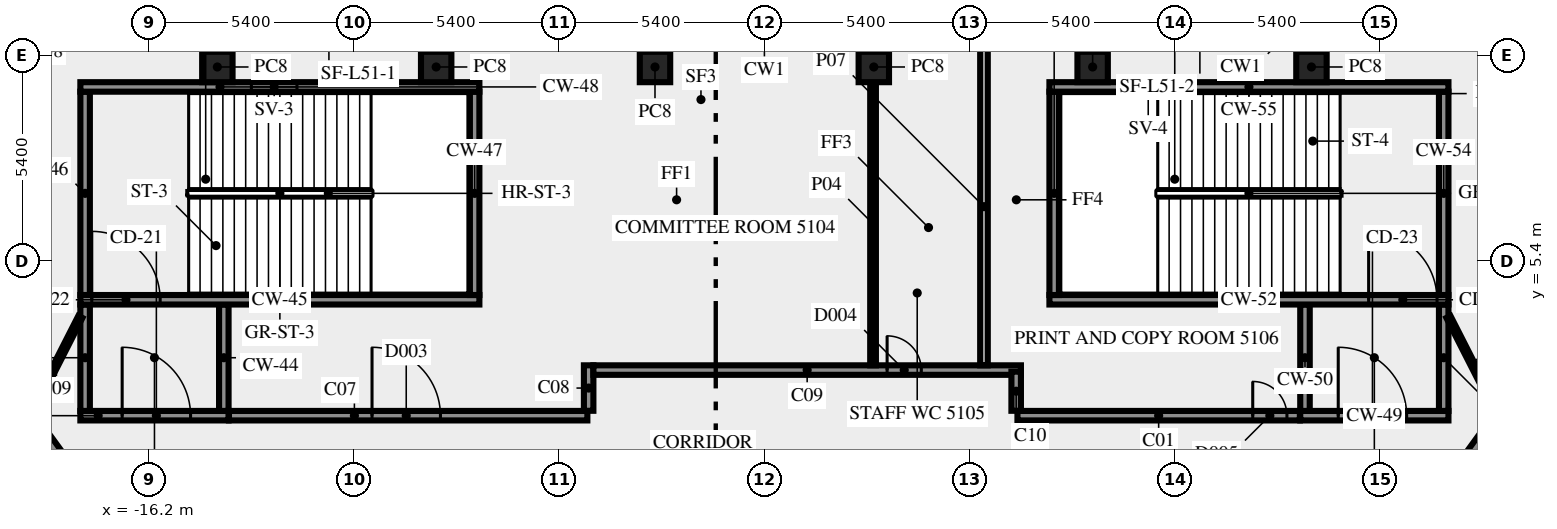
"""IFC4 building model, lengths in metres.
Left out: names, types, materials, properties, quantities, classifications, styles, units other than length and angle.
Written with IfcOpenShell. Run it as: python <this file> out.ifc"""

import sys

from ifc_helpers import new_model, si_unit, direction, frame, frame_2d, origin, origin_2d, place, context, subcontext, project, spatial, rectangle, extrude, element, fill, save


model = new_model("IFC4")
c1 = context("Model", 3, precision=1e-05, world=origin(), true_north=direction((0.0, 1.0)))
c2 = subcontext(c1, "Body", "Model", "MODEL_VIEW")
j1 = project(units=[si_unit("LENGTHUNIT", "METRE"), si_unit("PLANEANGLEUNIT", "RADIAN")], contexts=[c1])
p1 = place(None, origin())
s1 = spatial("IfcSite", under=j1, at=p1, CompositionType="ELEMENT")
p2 = place(p1, origin())
s2 = spatial("IfcBuilding", under=s1, at=p2, CompositionType="ELEMENT")
p3 = place(p2, frame((0.0, 0.0, 218.0)))
s3 = spatial("IfcBuildingStorey", under=s2, at=p3, CompositionType="ELEMENT", Elevation=218.0)
for number, where, z_axis, x_axis in (
    (1, (14.395, 10.5, 0.0), (0.0, 0.0, 1.0), (-1.0, 0.0, 0.0)),
    (2, (8.637, 10.5, 0.0), (0.0, 0.0, 1.0), (-1.0, 0.0, 0.0)),
    (3, (2.879, 10.5, 0.0), (0.0, 0.0, 1.0), (-1.0, 0.0, 0.0)),
    (4, (-2.879, 10.5, 0.0), (0.0, 0.0, 1.0), (-1.0, 0.0, 0.0)),
    (5, (-8.637, 10.5, 0.0), (0.0, 0.0, 1.0), (-1.0, 0.0, 0.0)),
    (6, (-14.395, 10.5, 0.0), (0.0, 0.0, 1.0), (-1.0, 0.0, 0.0)),
):
    element("IfcColumn", number, at=place(p3, frame(where, z_axis=z_axis, x_axis=x_axis)), inside=s3, PredefinedType="COLUMN", context=c2, shape_type="SweptSolid", body=[
        extrude(rectangle(XDim=0.8, YDim=0.8, at=origin_2d()), origin(), (0.0, 0.0, 1.0), 3.65),
    ])
p4 = place(p3, frame((-18.0, 1.325, 0.0), z_axis=(0.0, 0.0, 1.0), x_axis=(1.0, 0.0, 0.0)))
e7 = element("IfcWall", 7, at=p4, inside=s3, PredefinedType="SHEAR", context=c2, shape_type="SweptSolid", body=[
    extrude(rectangle(XDim=3.9, YDim=0.25, at=frame_2d((1.95, 0.0))), origin(), (0.0, 0.0, 1.0), 3.65),
])
p5 = place(p4, frame((1.1, 0.0, 0.0)))
e8 = element("IfcOpeningElement", 8, at=p5, cuts=e7, PredefinedType="OPENING", context=c2, shape_type="SweptSolid", body=[
    extrude(rectangle(XDim=1.8, YDim=2.1, at=frame_2d((0.9, 1.05))), frame((0.0, 0.135, 0.0), z_axis=(0.0, -1.0, 0.0), x_axis=(1.0, 0.0, 0.0)), (0.0, 0.0, 1.0), 0.27),
])
for number, where, z_axis, x_axis in (
    (9, (-17.875, 1.45, 0.0), (0.0, 0.0, 1.0), (0.0, 1.0, 0.0)),
    (10, (-14.225, 1.45, 0.0), (0.0, 0.0, 1.0), (0.0, 1.0, 0.0)),
):
    element("IfcWall", number, at=place(p3, frame(where, z_axis=z_axis, x_axis=x_axis)), inside=s3, PredefinedType="SHEAR", context=c2, shape_type="SweptSolid", body=[
        extrude(rectangle(XDim=2.8, YDim=0.25, at=frame_2d((1.4, 0.0))), origin(), (0.0, 0.0, 1.0), 3.65),
    ])
p6 = place(p3, frame((-18.0, 4.375, 0.0), z_axis=(0.0, 0.0, 1.0), x_axis=(1.0, 0.0, 0.0)))
e11 = element("IfcWall", 11, at=p6, inside=s3, PredefinedType="SHEAR", context=c2, shape_type="SweptSolid", body=[
    extrude(rectangle(XDim=10.5, YDim=0.25, at=frame_2d((5.25, 0.0))), origin(), (0.0, 0.0, 1.0), 3.65),
])
p7 = place(p6, frame((0.3, 0.0, 0.0)))
e12 = element("IfcOpeningElement", 12, at=p7, cuts=e11, PredefinedType="OPENING", context=c2, shape_type="SweptSolid", body=[
    extrude(rectangle(XDim=1.8, YDim=2.1, at=frame_2d((0.9, 1.05))), frame((0.0, 0.135, 0.0), z_axis=(0.0, -1.0, 0.0), x_axis=(1.0, 0.0, 0.0)), (0.0, 0.0, 1.0), 0.27),
])
for number, where, z_axis, x_axis in (
    (13, (-17.875, 4.5, 0.0), (0.0, 0.0, 1.0), (0.0, 1.0, 0.0)),
    (14, (-7.625, 4.5, 0.0), (0.0, 0.0, 1.0), (0.0, 1.0, 0.0)),
):
    element("IfcWall", number, at=place(p3, frame(where, z_axis=z_axis, x_axis=x_axis)), inside=s3, PredefinedType="SHEAR", context=c2, shape_type="SweptSolid", body=[
        extrude(rectangle(XDim=5.35, YDim=0.25, at=frame_2d((2.675, 0.0))), origin(), (0.0, 0.0, 1.0), 3.65),
    ])
p8 = place(p3, frame((-18.0, 9.975, 0.0), z_axis=(0.0, 0.0, 1.0), x_axis=(1.0, 0.0, 0.0)))
e15 = element("IfcWall", 15, at=p8, inside=s3, PredefinedType="SHEAR", context=c2, shape_type="SweptSolid", body=[
    extrude(rectangle(XDim=10.5, YDim=0.25, at=frame_2d((5.25, 0.0))), origin(), (0.0, 0.0, 1.0), 3.65),
])
p9 = place(p8, frame((4.5, 0.0, 1.0)))
e16 = element("IfcOpeningElement", 16, at=p9, cuts=e15, PredefinedType="OPENING", context=c2, shape_type="SweptSolid", body=[
    extrude(rectangle(XDim=1.2, YDim=1.2, at=frame_2d((0.6, 0.6))), frame((0.0, 0.135, 0.0), z_axis=(0.0, -1.0, 0.0), x_axis=(1.0, 0.0, 0.0)), (0.0, 0.0, 1.0), 0.27),
])
p10 = place(p3, frame((14.1, 1.325, 0.0), z_axis=(0.0, 0.0, 1.0), x_axis=(1.0, 0.0, 0.0)))
e17 = element("IfcWall", 17, at=p10, inside=s3, PredefinedType="SHEAR", context=c2, shape_type="SweptSolid", body=[
    extrude(rectangle(XDim=3.9, YDim=0.25, at=frame_2d((1.95, 0.0))), origin(), (0.0, 0.0, 1.0), 3.65),
])
p11 = place(p10, frame((1.0, 0.0, 0.0)))
e18 = element("IfcOpeningElement", 18, at=p11, cuts=e17, PredefinedType="OPENING", context=c2, shape_type="SweptSolid", body=[
    extrude(rectangle(XDim=1.8, YDim=2.1, at=frame_2d((0.9, 1.05))), frame((0.0, 0.135, 0.0), z_axis=(0.0, -1.0, 0.0), x_axis=(1.0, 0.0, 0.0)), (0.0, 0.0, 1.0), 0.27),
])
for number, where, z_axis, x_axis in (
    (19, (14.225, 1.45, 0.0), (0.0, 0.0, 1.0), (0.0, 1.0, 0.0)),
    (20, (17.875, 1.45, 0.0), (0.0, 0.0, 1.0), (0.0, 1.0, 0.0)),
):
    element("IfcWall", number, at=place(p3, frame(where, z_axis=z_axis, x_axis=x_axis)), inside=s3, PredefinedType="SHEAR", context=c2, shape_type="SweptSolid", body=[
        extrude(rectangle(XDim=2.8, YDim=0.25, at=frame_2d((1.4, 0.0))), origin(), (0.0, 0.0, 1.0), 3.65),
    ])
p12 = place(p3, frame((7.5, 4.375, 0.0), z_axis=(0.0, 0.0, 1.0), x_axis=(1.0, 0.0, 0.0)))
e21 = element("IfcWall", 21, at=p12, inside=s3, PredefinedType="SHEAR", context=c2, shape_type="SweptSolid", body=[
    extrude(rectangle(XDim=10.5, YDim=0.25, at=frame_2d((5.25, 0.0))), origin(), (0.0, 0.0, 1.0), 3.65),
])
p13 = place(p12, frame((8.4, 0.0, 0.0)))
e22 = element("IfcOpeningElement", 22, at=p13, cuts=e21, PredefinedType="OPENING", context=c2, shape_type="SweptSolid", body=[
    extrude(rectangle(XDim=1.8, YDim=2.1, at=frame_2d((0.9, 1.05))), frame((0.0, 0.135, 0.0), z_axis=(0.0, -1.0, 0.0), x_axis=(1.0, 0.0, 0.0)), (0.0, 0.0, 1.0), 0.27),
])
for number, where, z_axis, x_axis in (
    (23, (7.625, 4.5, 0.0), (0.0, 0.0, 1.0), (0.0, 1.0, 0.0)),
    (24, (17.875, 4.5, 0.0), (0.0, 0.0, 1.0), (0.0, 1.0, 0.0)),
):
    element("IfcWall", number, at=place(p3, frame(where, z_axis=z_axis, x_axis=x_axis)), inside=s3, PredefinedType="SHEAR", context=c2, shape_type="SweptSolid", body=[
        extrude(rectangle(XDim=5.35, YDim=0.25, at=frame_2d((2.675, 0.0))), origin(), (0.0, 0.0, 1.0), 3.65),
    ])
p14 = place(p3, frame((7.5, 9.975, 0.0), z_axis=(0.0, 0.0, 1.0), x_axis=(1.0, 0.0, 0.0)))
e25 = element("IfcWall", 25, at=p14, inside=s3, PredefinedType="SHEAR", context=c2, shape_type="SweptSolid", body=[
    extrude(rectangle(XDim=10.5, YDim=0.25, at=frame_2d((5.25, 0.0))), origin(), (0.0, 0.0, 1.0), 3.65),
])
p15 = place(p14, frame((2.0, 0.0, 1.0)))
e26 = element("IfcOpeningElement", 26, at=p15, cuts=e25, PredefinedType="OPENING", context=c2, shape_type="SweptSolid", body=[
    extrude(rectangle(XDim=1.2, YDim=1.2, at=frame_2d((0.6, 0.6))), frame((0.0, 0.135, 0.0), z_axis=(0.0, -1.0, 0.0), x_axis=(1.0, 0.0, 0.0)), (0.0, 0.0, 1.0), 0.27),
])
p16 = place(p3, frame((6.659, 1.325, 0.0), z_axis=(0.0, 0.0, 1.0), x_axis=(1.0, 0.0, 0.0)))
e27 = element("IfcWall", 27, at=p16, inside=s3, PredefinedType="SOLIDWALL", context=c2, shape_type="SweptSolid", body=[
    extrude(rectangle(XDim=7.431, YDim=0.25, at=frame_2d((3.716, 0.0))), origin(), (0.0, 0.0, 1.0), 3.65),
])
p17 = place(p16, frame((6.191, 0.0, 0.0)))
e28 = element("IfcOpeningElement", 28, at=p17, cuts=e27, PredefinedType="OPENING", context=c2, shape_type="SweptSolid", body=[
    extrude(rectangle(XDim=0.9, YDim=2.1, at=frame_2d((0.45, 1.05))), frame((0.0, 0.135, 0.0), z_axis=(0.0, -1.0, 0.0), x_axis=(1.0, 0.0, 0.0)), (0.0, 0.0, 1.0), 0.27),
])
p18 = place(p3, frame((17.545, -1.125, 0.0), z_axis=(0.0, 0.0, 1.0), x_axis=(0.587787966774, 0.809015022181, 0.0)))
e29 = element("IfcWall", 29, at=p18, inside=s3, PredefinedType="SOLIDWALL", context=c2, shape_type="SweptSolid", body=[
    extrude(rectangle(XDim=23.345, YDim=0.25, at=frame_2d((11.672, 0.0))), origin(), (0.0, 0.0, 1.0), 3.65),
])
p19 = place(p18, frame((3.441, 0.0, 0.0)))
e30 = element("IfcOpeningElement", 30, at=p19, cuts=e29, PredefinedType="OPENING", context=c2, shape_type="SweptSolid", body=[
    extrude(rectangle(XDim=0.9, YDim=2.1, at=frame_2d((0.45, 1.05))), frame((0.0, 0.135, 0.0), z_axis=(0.0, -1.0, 0.0), x_axis=(1.0, 0.0, 0.0)), (0.0, 0.0, 1.0), 0.27),
])
p20 = place(p3, frame((-31.918, 18.658, 0.0), z_axis=(0.0, 0.0, 1.0), x_axis=(0.587788731405, -0.80901446664, 0.0)))
e31 = element("IfcWall", 31, at=p20, inside=s3, PredefinedType="SOLIDWALL", context=c2, shape_type="SweptSolid", body=[
    extrude(rectangle(XDim=24.453, YDim=0.25, at=frame_2d((12.227, 0.0))), origin(), (0.0, 0.0, 1.0), 3.65),
])
p21 = place(p20, frame((8.395, 0.0, 0.0)))
e32 = element("IfcOpeningElement", 32, at=p21, cuts=e31, PredefinedType="OPENING", context=c2, shape_type="SweptSolid", body=[
    extrude(rectangle(XDim=1.0, YDim=2.1, at=frame_2d((0.5, 1.05))), frame((0.0, 0.135, 0.0), z_axis=(0.0, -1.0, 0.0), x_axis=(1.0, 0.0, 0.0)), (0.0, 0.0, 1.0), 0.27),
])
p22 = place(p20, frame((10.095, 0.0, 0.0)))
e33 = element("IfcOpeningElement", 33, at=p22, cuts=e31, PredefinedType="OPENING", context=c2, shape_type="SweptSolid", body=[
    extrude(rectangle(XDim=0.9, YDim=2.1, at=frame_2d((0.45, 1.05))), frame((0.0, 0.135, 0.0), z_axis=(0.0, -1.0, 0.0), x_axis=(1.0, 0.0, 0.0)), (0.0, 0.0, 1.0), 0.27),
])
p23 = place(p3, frame((-14.09, 1.325, 0.0), z_axis=(0.0, 0.0, 1.0), x_axis=(1.0, 0.0, 0.0)))
e34 = element("IfcWall", 34, at=p23, inside=s3, PredefinedType="SOLIDWALL", context=c2, shape_type="SweptSolid", body=[
    extrude(rectangle(XDim=9.431, YDim=0.25, at=frame_2d((4.716, 0.0))), origin(), (0.0, 0.0, 1.0), 3.65),
])
p24 = place(p23, frame((3.765, 0.0, 0.0)))
e35 = element("IfcOpeningElement", 35, at=p24, cuts=e34, PredefinedType="OPENING", context=c2, shape_type="SweptSolid", body=[
    extrude(rectangle(XDim=1.8, YDim=2.1, at=frame_2d((0.9, 1.05))), frame((0.0, 0.135, 0.0), z_axis=(0.0, -1.0, 0.0), x_axis=(1.0, 0.0, 0.0)), (0.0, 0.0, 1.0), 0.27),
])
p25 = place(p3, frame((-4.625, 1.454, 0.0), z_axis=(0.0, 0.0, 1.0), x_axis=(0.0, 1.0, 0.0)))
e36 = element("IfcWall", 36, at=p25, inside=s3, PredefinedType="SOLIDWALL", context=c2, shape_type="SweptSolid", body=[
    extrude(rectangle(XDim=1.196, YDim=0.25, at=frame_2d((0.598, 0.0))), origin(), (0.0, 0.0, 1.0), 3.65),
])
p26 = place(p3, frame((-4.5, 2.525, 0.0), z_axis=(0.0, 0.0, 1.0), x_axis=(1.0, 0.0, 0.0)))
e37 = element("IfcWall", 37, at=p26, inside=s3, PredefinedType="SOLIDWALL", context=c2, shape_type="SweptSolid", body=[
    extrude(rectangle(XDim=11.25, YDim=0.25, at=frame_2d((5.625, 0.0))), origin(), (0.0, 0.0, 1.0), 3.65),
])
p27 = place(p26, frame((7.729, 0.0, 0.0)))
e38 = element("IfcOpeningElement", 38, at=p27, cuts=e37, PredefinedType="OPENING", context=c2, shape_type="SweptSolid", body=[
    extrude(rectangle(XDim=0.9, YDim=2.1, at=frame_2d((0.45, 1.05))), frame((0.0, 0.135, 0.0), z_axis=(0.0, -1.0, 0.0), x_axis=(1.0, 0.0, 0.0)), (0.0, 0.0, 1.0), 0.27),
])
p28 = place(p3, frame((6.625, 2.484, 0.0), z_axis=(0.0, 0.0, 1.0), x_axis=(0.0, -1.0, 0.0)))
e39 = element("IfcWall", 39, at=p28, inside=s3, PredefinedType="SOLIDWALL", context=c2, shape_type="SweptSolid", body=[
    extrude(rectangle(XDim=1.03, YDim=0.25, at=frame_2d((0.515, 0.0))), origin(), (0.0, 0.0, 1.0), 3.65),
])
p29 = place(p3, frame((2.859, 2.65, 0.0), z_axis=(0.0, 0.0, 1.0), x_axis=(0.0, 1.0, 0.0)))
e40 = element("IfcWall", 40, at=p29, inside=s3, PredefinedType="PARTITIONING", context=c2, shape_type="SweptSolid", body=[
    extrude(rectangle(XDim=7.445, YDim=0.15, at=frame_2d((3.723, 0.0))), origin(), (0.0, 0.0, 1.0), 3.65),
])
p30 = place(p3, frame((-26.089, 10.848, 0.0), z_axis=(0.0, 0.0, 1.0), x_axis=(0.807661302092, 0.589646691759, 0.0)))
e41 = element("IfcWall", 41, at=p30, inside=s3, PredefinedType="PARTITIONING", context=c2, shape_type="SweptSolid", body=[
    extrude(rectangle(XDim=9.55, YDim=0.12, at=frame_2d((4.775, 0.0))), origin(), (0.0, 0.0, 1.0), 2.85),
])
p31 = place(p3, frame((5.778, 11.0, 0.0), z_axis=(0.0, 0.0, 1.0), x_axis=(0.0, -1.0, 0.0)))
e42 = element("IfcWall", 42, at=p31, inside=s3, PredefinedType="SOLIDWALL", context=c2, shape_type="SweptSolid", body=[
    extrude(rectangle(XDim=8.35, YDim=0.2, at=frame_2d((4.175, 0.0))), origin(), (0.0, 0.0, 1.0), 2.85),
])
for number, where, z_axis, x_axis in (
    (43, (18.0, 3.925, 0.0), (0.0, 0.0, 1.0), (0.454, -0.891, 0.0)),
    (44, (-19.261, 1.45, 0.0), (0.0, 0.0, 1.0), (0.454, 0.891, 0.0)),
):
    element("IfcWall", number, at=place(p3, frame(where, z_axis=z_axis, x_axis=x_axis)), inside=s3, PredefinedType="PARTITIONING", context=c2, shape_type="SweptSolid", body=[
        extrude(rectangle(XDim=2.778, YDim=0.12, at=frame_2d((1.389, 0.0))), origin(), (0.0, 0.0, 1.0), 3.65),
    ])
p32 = place(p5, origin())
e45 = element("IfcDoor", 45, at=p32, inside=s3, OperationType="DOUBLE_DOOR_SINGLE_SWING", PredefinedType="DOOR", context=c2, shape_type="SweptSolid", body=[
    extrude(rectangle(XDim=1.8, YDim=2.1, at=frame_2d((0.9, 1.05))), frame((0.0, 0.025, 0.0), z_axis=(0.0, -1.0, 0.0), x_axis=(1.0, 0.0, 0.0)), (0.0, 0.0, 1.0), 0.05),
])
fill(e8, e45)
p33 = place(p7, origin())
e46 = element("IfcDoor", 46, at=p33, inside=s3, OperationType="DOUBLE_DOOR_SINGLE_SWING", PredefinedType="DOOR", context=c2, shape_type="SweptSolid", body=[
    extrude(rectangle(XDim=1.8, YDim=2.1, at=frame_2d((0.9, 1.05))), frame((0.0, 0.025, 0.0), z_axis=(0.0, -1.0, 0.0), x_axis=(1.0, 0.0, 0.0)), (0.0, 0.0, 1.0), 0.05),
])
fill(e12, e46)
p34 = place(p9, origin())
e47 = element("IfcWindow", 47, at=p34, inside=s3, PartitioningType="SINGLE_PANEL", PredefinedType="WINDOW", context=c2, shape_type="SweptSolid", body=[
    extrude(rectangle(XDim=1.2, YDim=1.2, at=frame_2d((0.6, 0.6))), frame((0.0, 0.03, 0.0), z_axis=(0.0, -1.0, 0.0), x_axis=(1.0, 0.0, 0.0)), (0.0, 0.0, 1.0), 0.06),
])
fill(e16, e47)
p35 = place(p11, origin())
e48 = element("IfcDoor", 48, at=p35, inside=s3, OperationType="DOUBLE_DOOR_SINGLE_SWING", PredefinedType="DOOR", context=c2, shape_type="SweptSolid", body=[
    extrude(rectangle(XDim=1.8, YDim=2.1, at=frame_2d((0.9, 1.05))), frame((0.0, 0.025, 0.0), z_axis=(0.0, -1.0, 0.0), x_axis=(1.0, 0.0, 0.0)), (0.0, 0.0, 1.0), 0.05),
])
fill(e18, e48)
p36 = place(p13, origin())
e49 = element("IfcDoor", 49, at=p36, inside=s3, OperationType="DOUBLE_DOOR_SINGLE_SWING", PredefinedType="DOOR", context=c2, shape_type="SweptSolid", body=[
    extrude(rectangle(XDim=1.8, YDim=2.1, at=frame_2d((0.9, 1.05))), frame((0.0, 0.025, 0.0), z_axis=(0.0, -1.0, 0.0), x_axis=(1.0, 0.0, 0.0)), (0.0, 0.0, 1.0), 0.05),
])
fill(e22, e49)
p37 = place(p15, origin())
e50 = element("IfcWindow", 50, at=p37, inside=s3, PartitioningType="SINGLE_PANEL", PredefinedType="WINDOW", context=c2, shape_type="SweptSolid", body=[
    extrude(rectangle(XDim=1.2, YDim=1.2, at=frame_2d((0.6, 0.6))), frame((0.0, 0.03, 0.0), z_axis=(0.0, -1.0, 0.0), x_axis=(1.0, 0.0, 0.0)), (0.0, 0.0, 1.0), 0.06),
])
fill(e26, e50)
p38 = place(p24, origin())
e51 = element("IfcDoor", 51, at=p38, inside=s3, OperationType="DOUBLE_DOOR_SINGLE_SWING", PredefinedType="DOOR", context=c2, shape_type="SweptSolid", body=[
    extrude(rectangle(XDim=1.8, YDim=2.1, at=frame_2d((0.9, 1.05))), frame((0.0, 0.025, 0.0), z_axis=(0.0, -1.0, 0.0), x_axis=(1.0, 0.0, 0.0)), (0.0, 0.0, 1.0), 0.05),
])
fill(e35, e51)
p39 = place(p17, origin())
e52 = element("IfcDoor", 52, at=p39, inside=s3, OperationType="SINGLE_SWING_RIGHT", PredefinedType="DOOR", context=c2, shape_type="SweptSolid", body=[
    extrude(rectangle(XDim=0.9, YDim=2.1, at=frame_2d((0.45, 1.05))), frame((0.0, 0.025, 0.0), z_axis=(0.0, -1.0, 0.0), x_axis=(1.0, 0.0, 0.0)), (0.0, 0.0, 1.0), 0.05),
])
fill(e28, e52)
p40 = place(p27, origin())
e53 = element("IfcDoor", 53, at=p40, inside=s3, OperationType="SINGLE_SWING_LEFT", PredefinedType="DOOR", context=c2, shape_type="SweptSolid", body=[
    extrude(rectangle(XDim=0.9, YDim=2.1, at=frame_2d((0.45, 1.05))), frame((0.0, 0.025, 0.0), z_axis=(0.0, -1.0, 0.0), x_axis=(1.0, 0.0, 0.0)), (0.0, 0.0, 1.0), 0.05),
])
fill(e38, e53)
save(model, sys.argv[1])
